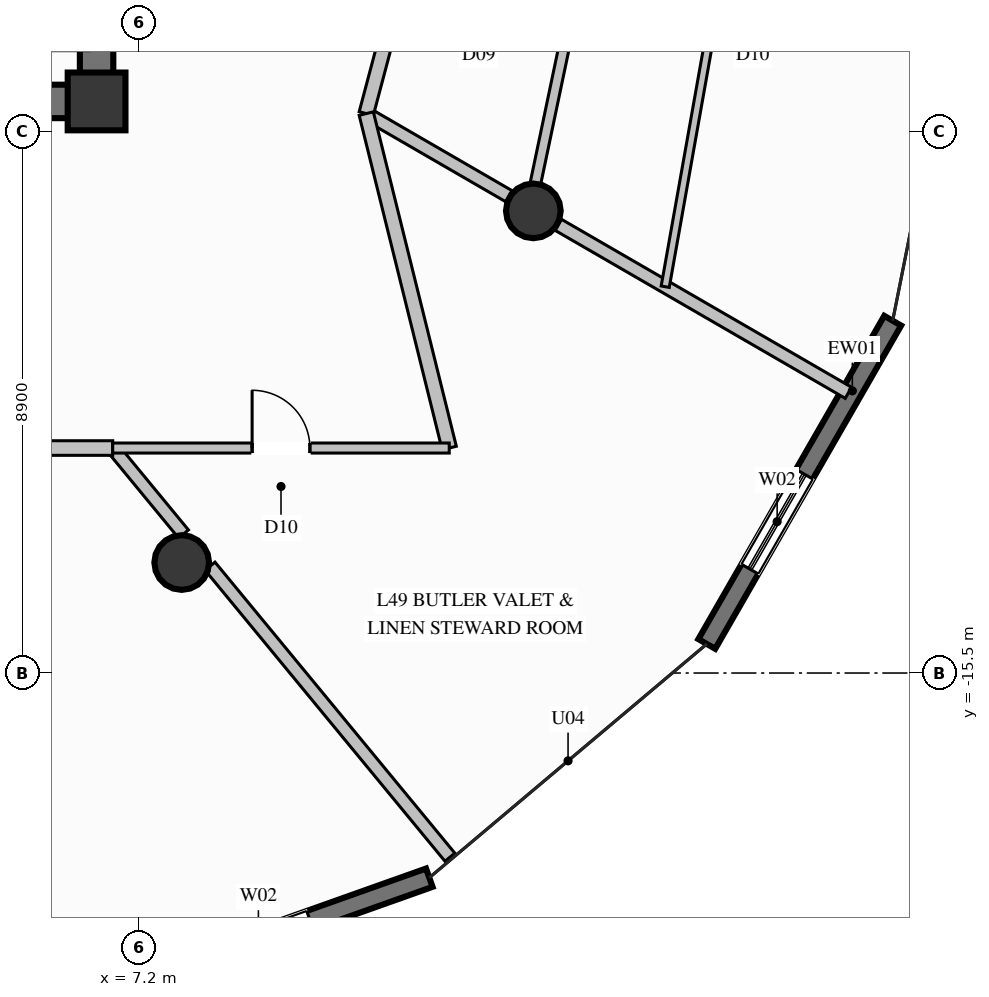
"""IFC4 building model, lengths in metres.
Left out: names, types, materials, properties, quantities, classifications, styles, units other than length and angle.
Written with IfcOpenShell. Run it as: python <this file> out.ifc"""

import sys

from ifc_helpers import new_model, si_unit, direction, frame, frame_2d, origin, origin_2d, place, context, subcontext, project, spatial, rectangle, circle, extrude, element, fill, save


model = new_model("IFC4")
c1 = context("Model", 3, precision=1e-05, world=origin(), true_north=direction((0.0, 1.0)))
c2 = subcontext(c1, "Body", "Model", "MODEL_VIEW")
j1 = project(units=[si_unit("LENGTHUNIT", "METRE"), si_unit("PLANEANGLEUNIT", "RADIAN")], contexts=[c1])
p1 = place(None, origin())
s1 = spatial("IfcSite", under=j1, at=p1, CompositionType="ELEMENT")
p2 = place(p1, origin())
s2 = spatial("IfcBuilding", under=s1, at=p2, CompositionType="ELEMENT")
p3 = place(p2, frame((0.0, 0.0, 191.2)))
s3 = spatial("IfcBuildingStorey", under=s2, at=p3, CompositionType="ELEMENT", Elevation=191.2)
p4 = place(p3, frame((6.5, -6.1, 0.0), z_axis=(0.0, 0.0, 1.0), x_axis=(1.0, 0.0, 0.0)))
e1 = element("IfcColumn", 1, at=p4, inside=s3, PredefinedType="COLUMN", context=c2, shape_type="SweptSolid", body=[
    extrude(rectangle(XDim=0.95, YDim=0.95, at=origin_2d()), origin(), (0.0, 0.0, 1.0), 3.6),
])
p5 = place(p3, frame((4.15, -6.1, 0.0), z_axis=(0.0, 0.0, 1.0), x_axis=(1.0, 0.0, 0.0)))
e2 = element("IfcWall", 2, at=p5, inside=s3, PredefinedType="SHEAR", context=c2, shape_type="SweptSolid", body=[
    extrude(rectangle(XDim=2.075, YDim=0.55, at=frame_2d((1.038, 0.0))), origin(), (0.0, 0.0, 1.0), 3.6),
])
p6 = place(p3, frame((6.5, -6.375, 0.0), z_axis=(0.0, 0.0, 1.0), x_axis=(0.0, 1.0, 0.0)))
e3 = element("IfcWall", 3, at=p6, inside=s3, PredefinedType="SHEAR", context=c2, shape_type="SweptSolid", body=[
    extrude(rectangle(XDim=4.025, YDim=0.55, at=frame_2d((2.012, 0.0))), origin(), (0.0, 0.0, 1.0), 3.6),
])
for number, where, z_axis, x_axis in (
    (4, (7.9, -13.683, 0.0), (0.0, 0.0, 1.0), (1.0, 0.0, 0.0)),
    (5, (13.683, -7.9, 0.0), (0.0, 0.0, 1.0), (1.0, 0.0, 0.0)),
):
    element("IfcColumn", number, at=place(p3, frame(where, z_axis=z_axis, x_axis=x_axis)), inside=s3, PredefinedType="COLUMN", context=c2, shape_type="SweptSolid", body=[
        extrude(circle(Radius=0.45, at=origin_2d()), origin(), (0.0, 0.0, 1.0), 3.6),
    ])
p7 = place(p3, frame((19.593, -9.706, 0.0), z_axis=(0.0, 0.0, 1.0), x_axis=(-0.498529467111, -0.866872753305, 0.0)))
e6 = element("IfcWall", 6, at=p7, inside=s3, PredefinedType="SOLIDWALL", context=c2, shape_type="SweptSolid", body=[
    extrude(rectangle(XDim=6.132, YDim=0.32, at=frame_2d((3.066, 0.0))), origin(), (0.0, 0.0, 1.0), 3.36),
])
p8 = place(p7, frame((2.912, 0.0, 0.35)))
e7 = element("IfcOpeningElement", 7, at=p8, cuts=e6, PredefinedType="OPENING", context=c2, shape_type="SweptSolid", body=[
    extrude(rectangle(XDim=1.8, YDim=2.6, at=frame_2d((0.9, 1.3))), frame((0.0, 0.17, 0.0), z_axis=(0.0, -1.0, 0.0), x_axis=(1.0, 0.0, 0.0)), (0.0, 0.0, 1.0), 0.34),
])
p9 = place(p3, frame((11.972, -18.866, 0.0), z_axis=(0.0, 0.0, 1.0), x_axis=(-0.942258310851, -0.334886959483, 0.0)))
e8 = element("IfcWall", 8, at=p9, inside=s3, PredefinedType="SOLIDWALL", context=c2, shape_type="SweptSolid", body=[
    extrude(rectangle(XDim=5.966, YDim=0.32, at=frame_2d((2.983, 0.0))), origin(), (0.0, 0.0, 1.0), 3.36),
])
p10 = place(p9, frame((2.083, 0.0, 0.35)))
e9 = element("IfcOpeningElement", 9, at=p10, cuts=e8, PredefinedType="OPENING", context=c2, shape_type="SweptSolid", body=[
    extrude(rectangle(XDim=1.8, YDim=2.6, at=frame_2d((0.9, 1.3))), frame((0.0, 0.17, 0.0), z_axis=(0.0, -1.0, 0.0), x_axis=(1.0, 0.0, 0.0)), (0.0, 0.0, 1.0), 0.34),
])
p11 = place(p3, frame((10.935, -6.3, 0.0), z_axis=(0.0, 0.0, 1.0), x_axis=(0.865378990195, -0.50111795351, 0.0)))
e10 = element("IfcWall", 10, at=p11, inside=s3, PredefinedType="PARTITIONING", context=c2, shape_type="SweptSolid", body=[
    extrude(rectangle(XDim=2.71, YDim=0.21, at=frame_2d((1.355, 0.0))), origin(), (0.0, 0.0, 1.0), 2.876),
])
p12 = place(p3, frame((14.093, -8.129, 0.0), z_axis=(0.0, 0.0, 1.0), x_axis=(0.865389908278, -0.501099098633, 0.0)))
e11 = element("IfcWall", 11, at=p12, inside=s3, PredefinedType="PARTITIONING", context=c2, shape_type="SweptSolid", body=[
    extrude(rectangle(XDim=5.514, YDim=0.21, at=frame_2d((2.757, 0.0))), origin(), (0.0, 0.0, 1.0), 3.36),
])
p13 = place(p3, frame((10.935, -6.3, 0.0), z_axis=(0.0, 0.0, 1.0), x_axis=(0.25685481711, 0.966450000221, 0.0)))
e12 = element("IfcWall", 12, at=p13, inside=s3, PredefinedType="PARTITIONING", context=c2, shape_type="SweptSolid", body=[
    extrude(rectangle(XDim=2.803, YDim=0.24, at=frame_2d((1.401, 0.0))), origin(), (0.0, 0.0, 1.0), 3.36),
])
p14 = place(p3, frame((13.631, -7.861, 0.0), z_axis=(0.0, 0.0, 1.0), x_axis=(0.205480954127, 0.978661114733, 0.0)))
e13 = element("IfcWall", 13, at=p14, inside=s3, PredefinedType="PLUMBINGWALL", context=c2, shape_type="SweptSolid", body=[
    extrude(rectangle(XDim=3.416, YDim=0.175, at=frame_2d((1.708, 0.0))), origin(), (0.0, 0.0, 1.0), 2.929),
])
p15 = place(p3, frame((15.852, -9.147, 0.0), z_axis=(0.0, 0.0, 1.0), x_axis=(0.17500689307, 0.984567208157, 0.0)))
e14 = element("IfcWall", 14, at=p15, inside=s3, PredefinedType="PARTITIONING", context=c2, shape_type="SweptSolid", body=[
    extrude(rectangle(XDim=9.348, YDim=0.135, at=frame_2d((4.674, 0.0))), origin(), (0.0, 0.0, 1.0), 3.36),
])
p16 = place(p15, frame((4.199, 0.0, 0.0)))
e15 = element("IfcOpeningElement", 15, at=p16, cuts=e14, PredefinedType="OPENING", context=c2, shape_type="SweptSolid", body=[
    extrude(rectangle(XDim=0.95, YDim=2.1, at=frame_2d((0.475, 1.05))), frame((0.0, 0.078, 0.0), z_axis=(0.0, -1.0, 0.0), x_axis=(1.0, 0.0, 0.0)), (0.0, 0.0, 1.0), 0.155),
])
p17 = place(p3, frame((6.765, -11.8, 0.0), z_axis=(0.0, 0.0, 1.0), x_axis=(0.635875381736, -0.771791745811, 0.0)))
e16 = element("IfcWall", 16, at=p17, inside=s3, PredefinedType="PARTITIONING", context=c2, shape_type="SweptSolid", body=[
    extrude(rectangle(XDim=1.832, YDim=0.21, at=frame_2d((0.916, 0.0))), origin(), (0.0, 0.0, 1.0), 3.36),
])
p18 = place(p3, frame((8.366, -13.743, 0.0), z_axis=(0.0, 0.0, 1.0), x_axis=(0.636047975174, -0.771649514532, 0.0)))
e17 = element("IfcWall", 17, at=p18, inside=s3, PredefinedType="PARTITIONING", context=c2, shape_type="SweptSolid", body=[
    extrude(rectangle(XDim=6.202, YDim=0.21, at=frame_2d((3.101, 0.0))), origin(), (0.0, 0.0, 1.0), 3.36),
])
p19 = place(p3, frame((0.0, -11.8, 0.0), z_axis=(0.0, 0.0, 1.0), x_axis=(1.0, 0.0, 0.0)))
e18 = element("IfcWall", 18, at=p19, inside=s3, PredefinedType="PARTITIONING", context=c2, shape_type="SweptSolid", body=[
    extrude(rectangle(XDim=6.765, YDim=0.24, at=frame_2d((3.382, 0.0))), origin(), (0.0, 0.0, 1.0), 3.36),
])
p20 = place(p3, frame((12.3, -11.8, 0.0), z_axis=(0.0, 0.0, 1.0), x_axis=(-0.240872801332, 0.970556692614, 0.0)))
e19 = element("IfcWall", 19, at=p20, inside=s3, PredefinedType="PARTITIONING", context=c2, shape_type="SweptSolid", body=[
    extrude(rectangle(XDim=5.667, YDim=0.24, at=frame_2d((2.833, 0.0))), origin(), (0.0, 0.0, 1.0), 3.36),
])
p21 = place(p3, frame((6.765, -11.8, 0.0), z_axis=(0.0, 0.0, 1.0), x_axis=(1.0, 0.0, 0.0)))
e20 = element("IfcWall", 20, at=p21, inside=s3, PredefinedType="PARTITIONING", context=c2, shape_type="SweptSolid", body=[
    extrude(rectangle(XDim=5.535, YDim=0.165, at=frame_2d((2.768, 0.0))), origin(), (0.0, 0.0, 1.0), 3.36),
])
p22 = place(p21, frame((2.293, 0.0, 0.0)))
e21 = element("IfcOpeningElement", 21, at=p22, cuts=e20, PredefinedType="OPENING", context=c2, shape_type="SweptSolid", body=[
    extrude(rectangle(XDim=0.95, YDim=2.1, at=frame_2d((0.475, 1.05))), frame((0.0, 0.093, 0.0), z_axis=(0.0, -1.0, 0.0), x_axis=(1.0, 0.0, 0.0)), (0.0, 0.0, 1.0), 0.185),
])
p23 = place(p8, origin())
e22 = element("IfcWindow", 22, at=p23, inside=s3, PartitioningType="SINGLE_PANEL", PredefinedType="WINDOW", context=c2, shape_type="SweptSolid", body=[
    extrude(rectangle(XDim=1.8, YDim=2.6, at=frame_2d((0.9, 1.3))), frame((0.0, 0.03, 0.0), z_axis=(0.0, -1.0, 0.0), x_axis=(1.0, 0.0, 0.0)), (0.0, 0.0, 1.0), 0.06),
])
fill(e7, e22)
p24 = place(p22, origin())
e23 = element("IfcDoor", 23, at=p24, inside=s3, OperationType="SINGLE_SWING_LEFT", PredefinedType="DOOR", context=c2, shape_type="SweptSolid", body=[
    extrude(rectangle(XDim=0.95, YDim=2.1, at=frame_2d((0.475, 1.05))), frame((0.0, 0.025, 0.0), z_axis=(0.0, -1.0, 0.0), x_axis=(1.0, 0.0, 0.0)), (0.0, 0.0, 1.0), 0.05),
])
fill(e21, e23)
save(model, sys.argv[1])
